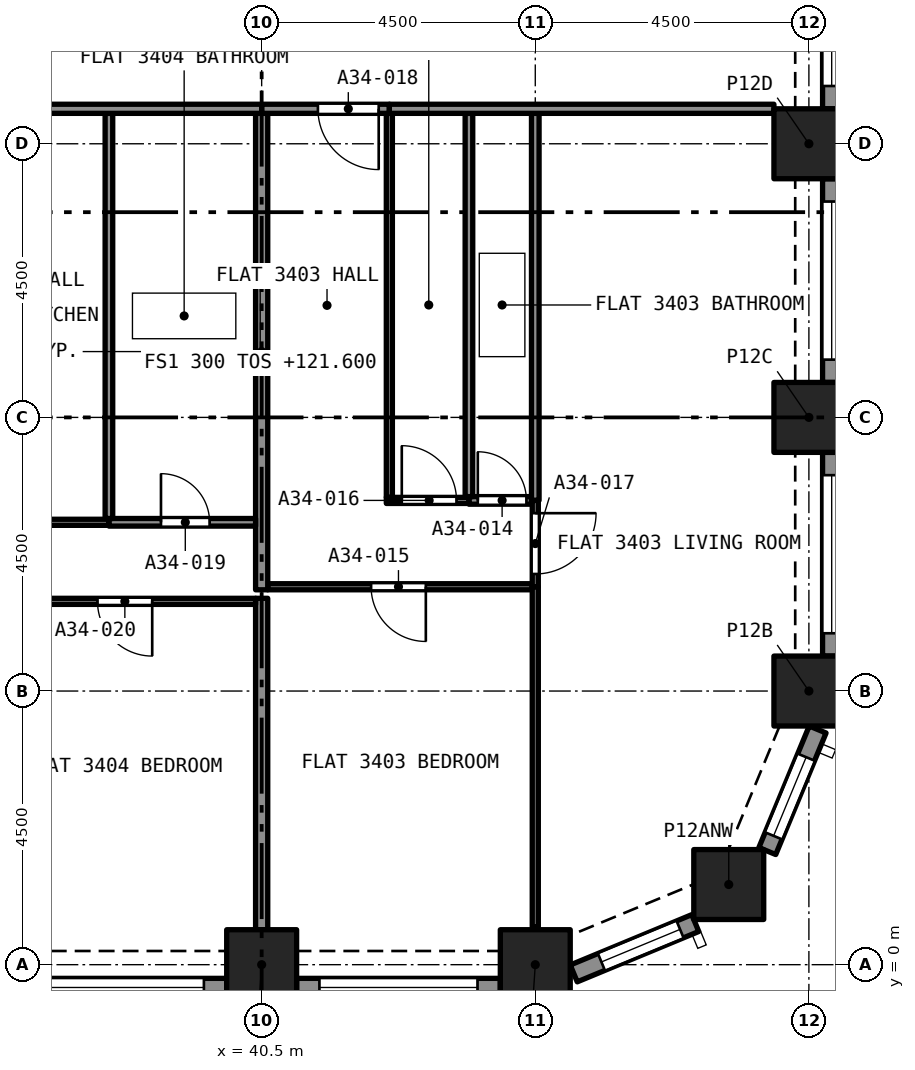
"""IFC4 building model, lengths in metres.
Left out: names, types, materials, properties, quantities, classifications, styles, units other than length and angle.
Written with IfcOpenShell. Run it as: python <this file> out.ifc"""

import sys

from ifc_helpers import new_model, si_unit, direction, frame, frame_2d, origin, origin_2d, place, context, subcontext, project, spatial, rectangle, extrude, element, fill, save


model = new_model("IFC4")
c1 = context("Model", 3, precision=1e-05, world=origin(), true_north=direction((0.0, 1.0)))
c2 = subcontext(c1, "Body", "Model", "MODEL_VIEW")
j1 = project(units=[si_unit("LENGTHUNIT", "METRE"), si_unit("PLANEANGLEUNIT", "RADIAN")], contexts=[c1])
p1 = place(None, origin())
s1 = spatial("IfcSite", under=j1, at=p1, CompositionType="ELEMENT")
p2 = place(p1, origin())
s2 = spatial("IfcBuilding", under=s1, at=p2, CompositionType="ELEMENT")
p3 = place(p2, frame((0.0, 0.0, 121.6)))
s3 = spatial("IfcBuildingStorey", under=s2, at=p3, CompositionType="ELEMENT", Elevation=121.6)
for number, where, z_axis, x_axis in (
    (1, (40.5, 0.0, 0.0), (0.0, 0.0, 1.0), (1.0, 0.0, 0.0)),
    (2, (45.0, 0.0, 0.0), (0.0, 0.0, 1.0), (1.0, 0.0, 0.0)),
    (3, (48.182, 1.318, 0.0), (0.0, 0.0, 1.0), (1.0, 0.0, 0.0)),
    (4, (49.5, 4.5, 0.0), (0.0, 0.0, 1.0), (1.0, 0.0, 0.0)),
    (5, (49.5, 9.0, 0.0), (0.0, 0.0, 1.0), (1.0, 0.0, 0.0)),
    (6, (49.5, 13.5, 0.0), (0.0, 0.0, 1.0), (1.0, 0.0, 0.0)),
):
    element("IfcColumn", number, at=place(p3, frame(where, z_axis=z_axis, x_axis=x_axis)), inside=s3, PredefinedType="COLUMN", context=c2, shape_type="SweptSolid", body=[
        extrude(rectangle(XDim=1.15, YDim=1.15, at=origin_2d()), origin(), (0.0, 0.0, 1.0), 3.2),
    ])
p4 = place(p3, frame((39.925, -0.375, 0.0), z_axis=(0.0, 0.0, 1.0), x_axis=(-1.0, 0.0, 0.0)))
e7 = element("IfcWall", 7, at=p4, inside=s3, PredefinedType="SOLIDWALL", context=c2, shape_type="SweptSolid", body=[
    extrude(rectangle(XDim=3.35, YDim=0.3, at=frame_2d((1.675, 0.0))), origin(), (0.0, 0.0, 1.0), 3.2),
])
p5 = place(p4, frame((0.375, 0.0, 0.45)))
e8 = element("IfcOpeningElement", 8, at=p5, cuts=e7, PredefinedType="OPENING", context=c2, shape_type="SweptSolid", body=[
    extrude(rectangle(XDim=2.6, YDim=1.95, at=frame_2d((1.3, 0.975))), frame((0.0, 0.16, 0.0), z_axis=(0.0, -1.0, 0.0), x_axis=(1.0, 0.0, 0.0)), (0.0, 0.0, 1.0), 0.32),
])
p6 = place(p3, frame((44.425, -0.375, 0.0), z_axis=(0.0, 0.0, 1.0), x_axis=(-1.0, 0.0, 0.0)))
e9 = element("IfcWall", 9, at=p6, inside=s3, PredefinedType="SOLIDWALL", context=c2, shape_type="SweptSolid", body=[
    extrude(rectangle(XDim=3.35, YDim=0.3, at=frame_2d((1.675, 0.0))), origin(), (0.0, 0.0, 1.0), 3.2),
])
p7 = place(p6, frame((0.375, 0.0, 0.45)))
e10 = element("IfcOpeningElement", 10, at=p7, cuts=e9, PredefinedType="OPENING", context=c2, shape_type="SweptSolid", body=[
    extrude(rectangle(XDim=2.6, YDim=1.95, at=frame_2d((1.3, 0.975))), frame((0.0, 0.16, 0.0), z_axis=(0.0, -1.0, 0.0), x_axis=(1.0, 0.0, 0.0)), (0.0, 0.0, 1.0), 0.32),
])
p8 = place(p3, frame((47.631, 0.684, 0.0), z_axis=(0.0, 0.0, 1.0), x_axis=(-0.923862802911, -0.382723818695, 0.0)))
e11 = element("IfcWall", 11, at=p8, inside=s3, PredefinedType="SOLIDWALL", context=c2, shape_type="SweptSolid", body=[
    extrude(rectangle(XDim=2.164, YDim=0.3, at=frame_2d((1.082, 0.0))), origin(), (0.0, 0.0, 1.0), 3.2),
])
p9 = place(p8, frame((0.271, 0.0, 0.45)))
e12 = element("IfcOpeningElement", 12, at=p9, cuts=e11, PredefinedType="OPENING", context=c2, shape_type="SweptSolid", body=[
    extrude(rectangle(XDim=1.4, YDim=1.95, at=frame_2d((0.7, 0.975))), frame((0.0, 0.16, 0.0), z_axis=(0.0, -1.0, 0.0), x_axis=(1.0, 0.0, 0.0)), (0.0, 0.0, 1.0), 0.32),
])
p10 = place(p3, frame((49.644, 3.868, 0.0), z_axis=(0.0, 0.0, 1.0), x_axis=(-0.382723818695, -0.923862802911, 0.0)))
e13 = element("IfcWall", 13, at=p10, inside=s3, PredefinedType="SOLIDWALL", context=c2, shape_type="SweptSolid", body=[
    extrude(rectangle(XDim=2.164, YDim=0.3, at=frame_2d((1.082, 0.0))), origin(), (0.0, 0.0, 1.0), 3.2),
])
p11 = place(p10, frame((0.493, 0.0, 0.45)))
e14 = element("IfcOpeningElement", 14, at=p11, cuts=e13, PredefinedType="OPENING", context=c2, shape_type="SweptSolid", body=[
    extrude(rectangle(XDim=1.4, YDim=1.95, at=frame_2d((0.7, 0.975))), frame((0.0, 0.16, 0.0), z_axis=(0.0, -1.0, 0.0), x_axis=(1.0, 0.0, 0.0)), (0.0, 0.0, 1.0), 0.32),
])
p12 = place(p3, frame((49.875, 8.425, 0.0), z_axis=(0.0, 0.0, 1.0), x_axis=(0.0, -1.0, 0.0)))
e15 = element("IfcWall", 15, at=p12, inside=s3, PredefinedType="SOLIDWALL", context=c2, shape_type="SweptSolid", body=[
    extrude(rectangle(XDim=3.35, YDim=0.3, at=frame_2d((1.675, 0.0))), origin(), (0.0, 0.0, 1.0), 3.2),
])
p13 = place(p12, frame((0.375, 0.0, 0.45)))
e16 = element("IfcOpeningElement", 16, at=p13, cuts=e15, PredefinedType="OPENING", context=c2, shape_type="SweptSolid", body=[
    extrude(rectangle(XDim=2.6, YDim=1.95, at=frame_2d((1.3, 0.975))), frame((0.0, 0.16, 0.0), z_axis=(0.0, -1.0, 0.0), x_axis=(1.0, 0.0, 0.0)), (0.0, 0.0, 1.0), 0.32),
])
p14 = place(p3, frame((49.875, 12.925, 0.0), z_axis=(0.0, 0.0, 1.0), x_axis=(0.0, -1.0, 0.0)))
e17 = element("IfcWall", 17, at=p14, inside=s3, PredefinedType="SOLIDWALL", context=c2, shape_type="SweptSolid", body=[
    extrude(rectangle(XDim=3.35, YDim=0.3, at=frame_2d((1.675, 0.0))), origin(), (0.0, 0.0, 1.0), 3.2),
])
p15 = place(p14, frame((0.375, 0.0, 0.45)))
e18 = element("IfcOpeningElement", 18, at=p15, cuts=e17, PredefinedType="OPENING", context=c2, shape_type="SweptSolid", body=[
    extrude(rectangle(XDim=2.6, YDim=1.95, at=frame_2d((1.3, 0.975))), frame((0.0, 0.16, 0.0), z_axis=(0.0, -1.0, 0.0), x_axis=(1.0, 0.0, 0.0)), (0.0, 0.0, 1.0), 0.32),
])
p16 = place(p3, frame((49.875, 17.425, 0.0), z_axis=(0.0, 0.0, 1.0), x_axis=(0.0, -1.0, 0.0)))
e19 = element("IfcWall", 19, at=p16, inside=s3, PredefinedType="SOLIDWALL", context=c2, shape_type="SweptSolid", body=[
    extrude(rectangle(XDim=3.35, YDim=0.3, at=frame_2d((1.675, 0.0))), origin(), (0.0, 0.0, 1.0), 3.2),
])
p17 = place(p16, frame((0.375, 0.0, 0.45)))
e20 = element("IfcOpeningElement", 20, at=p17, cuts=e19, PredefinedType="OPENING", context=c2, shape_type="SweptSolid", body=[
    extrude(rectangle(XDim=2.6, YDim=1.95, at=frame_2d((1.3, 0.975))), frame((0.0, 0.16, 0.0), z_axis=(0.0, -1.0, 0.0), x_axis=(1.0, 0.0, 0.0)), (0.0, 0.0, 1.0), 0.32),
])
p18 = place(p3, frame((43.909, 7.635, 0.0), z_axis=(0.0, 0.0, 1.0), x_axis=(1.0, 0.0, 0.0)))
e21 = element("IfcWall", 21, at=p18, inside=s3, PredefinedType="PARTITIONING", context=c2, shape_type="SweptSolid", body=[
    extrude(rectangle(XDim=1.028, YDim=0.125, at=frame_2d((0.514, 0.0))), origin(), (0.0, 0.0, 1.0), 2.85),
])
p19 = place(p18, frame((0.146, 0.0, 0.0)))
e22 = element("IfcOpeningElement", 22, at=p19, cuts=e21, PredefinedType="OPENING", context=c2, shape_type="SweptSolid", body=[
    extrude(rectangle(XDim=0.8, YDim=2.1, at=frame_2d((0.4, 1.05))), frame((0.0, 0.073, 0.0), z_axis=(0.0, -1.0, 0.0), x_axis=(1.0, 0.0, 0.0)), (0.0, 0.0, 1.0), 0.145),
])
p20 = place(p3, frame((43.909, 7.698, 0.0), z_axis=(0.0, 0.0, 1.0), x_axis=(0.0, 1.0, 0.0)))
e23 = element("IfcWall", 23, at=p20, inside=s3, PredefinedType="PARTITIONING", context=c2, shape_type="SweptSolid", body=[
    extrude(rectangle(XDim=6.302, YDim=0.125, at=frame_2d((3.151, 0.0))), origin(), (0.0, 0.0, 1.0), 2.85),
])
p21 = place(p3, frame((45.0, 7.635, 0.0), z_axis=(0.0, 0.0, 1.0), x_axis=(0.0, 1.0, 0.0)))
e24 = element("IfcWall", 24, at=p21, inside=s3, PredefinedType="PARTITIONING", context=c2, shape_type="SweptSolid", body=[
    extrude(rectangle(XDim=6.365, YDim=0.125, at=frame_2d((3.183, 0.0))), origin(), (0.0, 0.0, 1.0), 2.85),
])
p22 = place(p3, frame((44.95, 6.215, 0.0), z_axis=(0.0, 0.0, 1.0), x_axis=(-1.0, 0.0, 0.0)))
e25 = element("IfcWall", 25, at=p22, inside=s3, PredefinedType="PARTITIONING", context=c2, shape_type="SweptSolid", body=[
    extrude(rectangle(XDim=4.35, YDim=0.1, at=frame_2d((2.175, 0.0))), origin(), (0.0, 0.0, 1.0), 2.85),
])
p23 = place(p22, frame((1.75, 0.0, 0.0)))
e26 = element("IfcOpeningElement", 26, at=p23, cuts=e25, PredefinedType="OPENING", context=c2, shape_type="SweptSolid", body=[
    extrude(rectangle(XDim=0.9, YDim=2.1, at=frame_2d((0.45, 1.05))), frame((0.0, 0.06, 0.0), z_axis=(0.0, -1.0, 0.0), x_axis=(1.0, 0.0, 0.0)), (0.0, 0.0, 1.0), 0.12),
])
p24 = place(p3, frame((45.0, 0.622, 0.0), z_axis=(0.0, 0.0, 1.0), x_axis=(0.0, 1.0, 0.0)))
e27 = element("IfcWall", 27, at=p24, inside=s3, PredefinedType="PARTITIONING", context=c2, shape_type="SweptSolid", body=[
    extrude(rectangle(XDim=5.593, YDim=0.1, at=frame_2d((2.796, 0.0))), origin(), (0.0, 0.0, 1.0), 2.85),
])
p25 = place(p3, frame((40.5, 0.575, 0.0), z_axis=(0.0, 0.0, 1.0), x_axis=(0.0, 1.0, 0.0)))
e28 = element("IfcWall", 28, at=p25, inside=s3, PredefinedType="PARTITIONING", context=c2, shape_type="SweptSolid", body=[
    extrude(rectangle(XDim=5.45, YDim=0.2, at=frame_2d((2.725, 0.0))), origin(), (0.0, 0.0, 1.0), 2.85),
])
p26 = place(p3, frame((42.6, 7.685, 0.0), z_axis=(0.0, 0.0, 1.0), x_axis=(0.0, 1.0, 0.0)))
e29 = element("IfcWall", 29, at=p26, inside=s3, PredefinedType="PARTITIONING", context=c2, shape_type="SweptSolid", body=[
    extrude(rectangle(XDim=6.315, YDim=0.1, at=frame_2d((3.157, 0.0))), origin(), (0.0, 0.0, 1.0), 2.85),
])
p27 = place(p3, frame((42.55, 7.635, 0.0), z_axis=(0.0, 0.0, 1.0), x_axis=(1.0, 0.0, 0.0)))
e30 = element("IfcWall", 30, at=p27, inside=s3, PredefinedType="PARTITIONING", context=c2, shape_type="SweptSolid", body=[
    extrude(rectangle(XDim=1.359, YDim=0.1, at=frame_2d((0.68, 0.0))), origin(), (0.0, 0.0, 1.0), 2.85),
])
p28 = place(p27, frame((0.254, 0.0, 0.0)))
e31 = element("IfcOpeningElement", 31, at=p28, cuts=e30, PredefinedType="OPENING", context=c2, shape_type="SweptSolid", body=[
    extrude(rectangle(XDim=0.9, YDim=2.1, at=frame_2d((0.45, 1.05))), frame((0.0, 0.06, 0.0), z_axis=(0.0, -1.0, 0.0), x_axis=(1.0, 0.0, 0.0)), (0.0, 0.0, 1.0), 0.12),
])
p29 = place(p3, frame((45.0, 7.635, 0.0), z_axis=(0.0, 0.0, 1.0), x_axis=(0.0, -1.0, 0.0)))
e32 = element("IfcWall", 32, at=p29, inside=s3, PredefinedType="PARTITIONING", context=c2, shape_type="SweptSolid", body=[
    extrude(rectangle(XDim=1.42, YDim=0.1, at=frame_2d((0.71, 0.0))), origin(), (0.0, 0.0, 1.0), 2.85),
])
p30 = place(p29, frame((0.21, 0.0, 0.0)))
e33 = element("IfcOpeningElement", 33, at=p30, cuts=e32, PredefinedType="OPENING", context=c2, shape_type="SweptSolid", body=[
    extrude(rectangle(XDim=1.0, YDim=2.1, at=frame_2d((0.5, 1.05))), frame((0.0, 0.06, 0.0), z_axis=(0.0, -1.0, 0.0), x_axis=(1.0, 0.0, 0.0)), (0.0, 0.0, 1.0), 0.12),
])
p31 = place(p3, frame((40.5, 6.165, 0.0), z_axis=(0.0, 0.0, 1.0), x_axis=(0.0, 1.0, 0.0)))
e34 = element("IfcWall", 34, at=p31, inside=s3, PredefinedType="PARTITIONING", context=c2, shape_type="SweptSolid", body=[
    extrude(rectangle(XDim=7.835, YDim=0.2, at=frame_2d((3.917, 0.0))), origin(), (0.0, 0.0, 1.0), 2.85),
])
p32 = place(p3, frame((42.6, 14.075, 0.0), z_axis=(0.0, 0.0, 1.0), x_axis=(-1.0, 0.0, 0.0)))
e35 = element("IfcWall", 35, at=p32, inside=s3, PredefinedType="PARTITIONING", context=c2, shape_type="SweptSolid", body=[
    extrude(rectangle(XDim=2.1, YDim=0.15, at=frame_2d((1.05, 0.0))), origin(), (0.0, 0.0, 1.0), 2.85),
])
p33 = place(p32, frame((0.175, 0.0, 0.0)))
e36 = element("IfcOpeningElement", 36, at=p33, cuts=e35, PredefinedType="OPENING", context=c2, shape_type="SweptSolid", body=[
    extrude(rectangle(XDim=1.0, YDim=2.1, at=frame_2d((0.5, 1.05))), frame((0.0, 0.085, 0.0), z_axis=(0.0, -1.0, 0.0), x_axis=(1.0, 0.0, 0.0)), (0.0, 0.0, 1.0), 0.17),
])
p34 = place(p3, frame((42.6, 14.075, 0.0), z_axis=(0.0, 0.0, 1.0), x_axis=(1.0, 0.0, 0.0)))
e37 = element("IfcWall", 37, at=p34, inside=s3, PredefinedType="PARTITIONING", context=c2, shape_type="SweptSolid", body=[
    extrude(rectangle(XDim=6.325, YDim=0.15, at=frame_2d((3.163, 0.0))), origin(), (0.0, 0.0, 1.0), 2.85),
])
p35 = place(p3, frame((37.988, 7.275, 0.0), z_axis=(0.0, 0.0, 1.0), x_axis=(1.0, 0.0, 0.0)))
e38 = element("IfcWall", 38, at=p35, inside=s3, PredefinedType="PARTITIONING", context=c2, shape_type="SweptSolid", body=[
    extrude(rectangle(XDim=2.412, YDim=0.125, at=frame_2d((1.206, 0.0))), origin(), (0.0, 0.0, 1.0), 2.85),
])
p36 = place(p35, frame((0.856, 0.0, 0.0)))
e39 = element("IfcOpeningElement", 39, at=p36, cuts=e38, PredefinedType="OPENING", context=c2, shape_type="SweptSolid", body=[
    extrude(rectangle(XDim=0.8, YDim=2.1, at=frame_2d((0.4, 1.05))), frame((0.0, 0.073, 0.0), z_axis=(0.0, -1.0, 0.0), x_axis=(1.0, 0.0, 0.0)), (0.0, 0.0, 1.0), 0.145),
])
p37 = place(p3, frame((37.988, 7.337, 0.0), z_axis=(0.0, 0.0, 1.0), x_axis=(0.0, 1.0, 0.0)))
e40 = element("IfcWall", 40, at=p37, inside=s3, PredefinedType="PARTITIONING", context=c2, shape_type="SweptSolid", body=[
    extrude(rectangle(XDim=6.663, YDim=0.125, at=frame_2d((3.331, 0.0))), origin(), (0.0, 0.0, 1.0), 2.85),
])
p38 = place(p3, frame((40.4, 5.975, 0.0), z_axis=(0.0, 0.0, 1.0), x_axis=(-1.0, 0.0, 0.0)))
e41 = element("IfcWall", 41, at=p38, inside=s3, PredefinedType="PARTITIONING", context=c2, shape_type="SweptSolid", body=[
    extrude(rectangle(XDim=4.4, YDim=0.1, at=frame_2d((2.2, 0.0))), origin(), (0.0, 0.0, 1.0), 2.85),
])
p39 = place(p38, frame((1.7, 0.0, 0.0)))
e42 = element("IfcOpeningElement", 42, at=p39, cuts=e41, PredefinedType="OPENING", context=c2, shape_type="SweptSolid", body=[
    extrude(rectangle(XDim=0.9, YDim=2.1, at=frame_2d((0.45, 1.05))), frame((0.0, 0.06, 0.0), z_axis=(0.0, -1.0, 0.0), x_axis=(1.0, 0.0, 0.0)), (0.0, 0.0, 1.0), 0.12),
])
p40 = place(p3, frame((34.375, 7.275, 0.0), z_axis=(0.0, 0.0, 1.0), x_axis=(1.0, 0.0, 0.0)))
e43 = element("IfcWall", 43, at=p40, inside=s3, PredefinedType="PARTITIONING", context=c2, shape_type="SweptSolid", body=[
    extrude(rectangle(XDim=3.613, YDim=0.1, at=frame_2d((1.807, 0.0))), origin(), (0.0, 0.0, 1.0), 2.85),
])
p41 = place(p40, frame((1.382, 0.0, 0.0)))
e44 = element("IfcOpeningElement", 44, at=p41, cuts=e43, PredefinedType="OPENING", context=c2, shape_type="SweptSolid", body=[
    extrude(rectangle(XDim=0.9, YDim=2.1, at=frame_2d((0.45, 1.05))), frame((0.0, 0.06, 0.0), z_axis=(0.0, -1.0, 0.0), x_axis=(1.0, 0.0, 0.0)), (0.0, 0.0, 1.0), 0.12),
])
p42 = place(p3, frame((34.425, 14.075, 0.0), z_axis=(0.0, 0.0, 1.0), x_axis=(1.0, 0.0, 0.0)))
e45 = element("IfcWall", 45, at=p42, inside=s3, PredefinedType="PARTITIONING", context=c2, shape_type="SweptSolid", body=[
    extrude(rectangle(XDim=6.075, YDim=0.15, at=frame_2d((3.038, 0.0))), origin(), (0.0, 0.0, 1.0), 2.85),
])
p43 = place(p5, origin())
e46 = element("IfcWindow", 46, at=p43, inside=s3, PartitioningType="SINGLE_PANEL", PredefinedType="WINDOW", context=c2, shape_type="SweptSolid", body=[
    extrude(rectangle(XDim=2.6, YDim=1.95, at=frame_2d((1.3, 0.975))), frame((0.0, 0.03, 0.0), z_axis=(0.0, -1.0, 0.0), x_axis=(1.0, 0.0, 0.0)), (0.0, 0.0, 1.0), 0.06),
])
fill(e8, e46)
p44 = place(p7, origin())
e47 = element("IfcWindow", 47, at=p44, inside=s3, PartitioningType="SINGLE_PANEL", PredefinedType="WINDOW", context=c2, shape_type="SweptSolid", body=[
    extrude(rectangle(XDim=2.6, YDim=1.95, at=frame_2d((1.3, 0.975))), frame((0.0, 0.03, 0.0), z_axis=(0.0, -1.0, 0.0), x_axis=(1.0, 0.0, 0.0)), (0.0, 0.0, 1.0), 0.06),
])
fill(e10, e47)
p45 = place(p9, origin())
e48 = element("IfcWindow", 48, at=p45, inside=s3, PartitioningType="SINGLE_PANEL", PredefinedType="WINDOW", context=c2, shape_type="SweptSolid", body=[
    extrude(rectangle(XDim=1.4, YDim=1.95, at=frame_2d((0.7, 0.975))), frame((0.0, 0.03, 0.0), z_axis=(0.0, -1.0, 0.0), x_axis=(1.0, 0.0, 0.0)), (0.0, 0.0, 1.0), 0.06),
])
fill(e12, e48)
p46 = place(p11, origin())
e49 = element("IfcWindow", 49, at=p46, inside=s3, PartitioningType="SINGLE_PANEL", PredefinedType="WINDOW", context=c2, shape_type="SweptSolid", body=[
    extrude(rectangle(XDim=1.4, YDim=1.95, at=frame_2d((0.7, 0.975))), frame((0.0, 0.03, 0.0), z_axis=(0.0, -1.0, 0.0), x_axis=(1.0, 0.0, 0.0)), (0.0, 0.0, 1.0), 0.06),
])
fill(e14, e49)
p47 = place(p13, origin())
e50 = element("IfcWindow", 50, at=p47, inside=s3, PartitioningType="SINGLE_PANEL", PredefinedType="WINDOW", context=c2, shape_type="SweptSolid", body=[
    extrude(rectangle(XDim=2.6, YDim=1.95, at=frame_2d((1.3, 0.975))), frame((0.0, 0.03, 0.0), z_axis=(0.0, -1.0, 0.0), x_axis=(1.0, 0.0, 0.0)), (0.0, 0.0, 1.0), 0.06),
])
fill(e16, e50)
p48 = place(p15, origin())
e51 = element("IfcWindow", 51, at=p48, inside=s3, PartitioningType="SINGLE_PANEL", PredefinedType="WINDOW", context=c2, shape_type="SweptSolid", body=[
    extrude(rectangle(XDim=2.6, YDim=1.95, at=frame_2d((1.3, 0.975))), frame((0.0, 0.03, 0.0), z_axis=(0.0, -1.0, 0.0), x_axis=(1.0, 0.0, 0.0)), (0.0, 0.0, 1.0), 0.06),
])
fill(e18, e51)
p49 = place(p17, origin())
e52 = element("IfcWindow", 52, at=p49, inside=s3, PartitioningType="SINGLE_PANEL", PredefinedType="WINDOW", context=c2, shape_type="SweptSolid", body=[
    extrude(rectangle(XDim=2.6, YDim=1.95, at=frame_2d((1.3, 0.975))), frame((0.0, 0.03, 0.0), z_axis=(0.0, -1.0, 0.0), x_axis=(1.0, 0.0, 0.0)), (0.0, 0.0, 1.0), 0.06),
])
fill(e20, e52)
p50 = place(p19, origin())
e53 = element("IfcDoor", 53, at=p50, inside=s3, OperationType="SINGLE_SWING_RIGHT", PredefinedType="DOOR", context=c2, shape_type="SweptSolid", body=[
    extrude(rectangle(XDim=0.8, YDim=2.1, at=frame_2d((0.4, 1.05))), frame((0.0, 0.025, 0.0), z_axis=(0.0, -1.0, 0.0), x_axis=(1.0, 0.0, 0.0)), (0.0, 0.0, 1.0), 0.05),
])
fill(e22, e53)
p51 = place(p23, origin())
e54 = element("IfcDoor", 54, at=p51, inside=s3, OperationType="SINGLE_SWING_RIGHT", PredefinedType="DOOR", context=c2, shape_type="SweptSolid", body=[
    extrude(rectangle(XDim=0.9, YDim=2.1, at=frame_2d((0.45, 1.05))), frame((0.0, 0.025, 0.0), z_axis=(0.0, -1.0, 0.0), x_axis=(1.0, 0.0, 0.0)), (0.0, 0.0, 1.0), 0.05),
])
fill(e26, e54)
p52 = place(p28, origin())
e55 = element("IfcDoor", 55, at=p52, inside=s3, OperationType="SINGLE_SWING_RIGHT", PredefinedType="DOOR", context=c2, shape_type="SweptSolid", body=[
    extrude(rectangle(XDim=0.9, YDim=2.1, at=frame_2d((0.45, 1.05))), frame((0.0, 0.025, 0.0), z_axis=(0.0, -1.0, 0.0), x_axis=(1.0, 0.0, 0.0)), (0.0, 0.0, 1.0), 0.05),
])
fill(e31, e55)
p53 = place(p30, origin())
e56 = element("IfcDoor", 56, at=p53, inside=s3, OperationType="SINGLE_SWING_RIGHT", PredefinedType="DOOR", context=c2, shape_type="SweptSolid", body=[
    extrude(rectangle(XDim=1.0, YDim=2.1, at=frame_2d((0.5, 1.05))), frame((0.0, 0.025, 0.0), z_axis=(0.0, -1.0, 0.0), x_axis=(1.0, 0.0, 0.0)), (0.0, 0.0, 1.0), 0.05),
])
fill(e33, e56)
p54 = place(p33, origin())
e57 = element("IfcDoor", 57, at=p54, inside=s3, OperationType="SINGLE_SWING_LEFT", PredefinedType="DOOR", context=c2, shape_type="SweptSolid", body=[
    extrude(rectangle(XDim=1.0, YDim=2.1, at=frame_2d((0.5, 1.05))), frame((0.0, 0.025, 0.0), z_axis=(0.0, -1.0, 0.0), x_axis=(1.0, 0.0, 0.0)), (0.0, 0.0, 1.0), 0.05),
])
fill(e36, e57)
p55 = place(p36, origin())
e58 = element("IfcDoor", 58, at=p55, inside=s3, OperationType="SINGLE_SWING_RIGHT", PredefinedType="DOOR", context=c2, shape_type="SweptSolid", body=[
    extrude(rectangle(XDim=0.8, YDim=2.1, at=frame_2d((0.4, 1.05))), frame((0.0, 0.025, 0.0), z_axis=(0.0, -1.0, 0.0), x_axis=(1.0, 0.0, 0.0)), (0.0, 0.0, 1.0), 0.05),
])
fill(e39, e58)
p56 = place(p39, origin())
e59 = element("IfcDoor", 59, at=p56, inside=s3, OperationType="SINGLE_SWING_LEFT", PredefinedType="DOOR", context=c2, shape_type="SweptSolid", body=[
    extrude(rectangle(XDim=0.9, YDim=2.1, at=frame_2d((0.45, 1.05))), frame((0.0, 0.025, 0.0), z_axis=(0.0, -1.0, 0.0), x_axis=(1.0, 0.0, 0.0)), (0.0, 0.0, 1.0), 0.05),
])
fill(e42, e59)
save(model, sys.argv[1])
